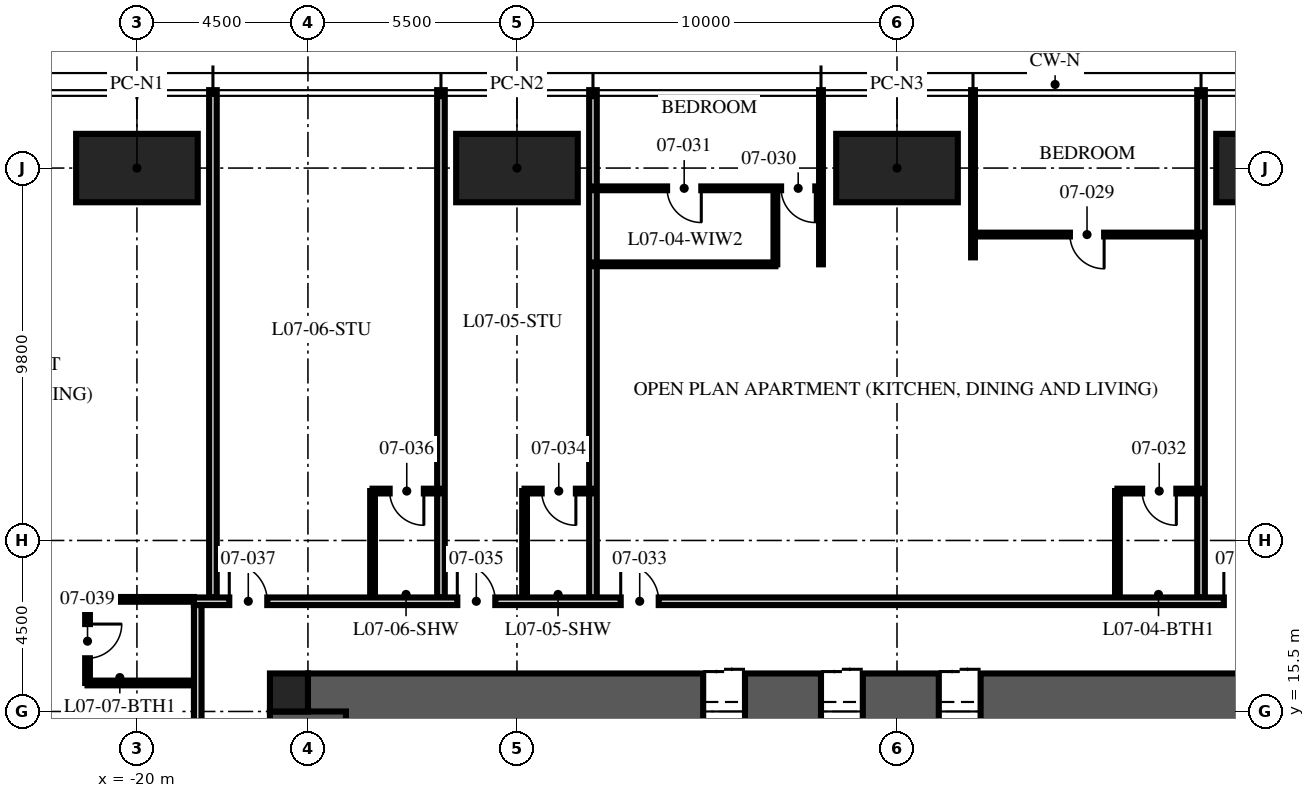
"""IFC4 building model, lengths in metres.
Left out: names, types, materials, properties, quantities, classifications, styles, units other than length and angle.
Written with IfcOpenShell. Run it as: python <this file> out.ifc"""

import sys

from ifc_helpers import new_model, si_unit, direction, frame, frame_2d, origin, origin_2d, place, context, subcontext, project, spatial, rectangle, hollow_rectangle, extrude, element, fill, save


model = new_model("IFC4")
c1 = context("Model", 3, precision=1e-05, world=origin(), true_north=direction((0.0, 1.0)))
c2 = subcontext(c1, "Body", "Model", "MODEL_VIEW")
j1 = project(units=[si_unit("LENGTHUNIT", "METRE"), si_unit("PLANEANGLEUNIT", "RADIAN")], contexts=[c1])
p1 = place(None, origin())
s1 = spatial("IfcSite", under=j1, at=p1, CompositionType="ELEMENT")
p2 = place(p1, origin())
s2 = spatial("IfcBuilding", under=s1, at=p2, CompositionType="ELEMENT")
p3 = place(p2, frame((0.0, 0.0, 32.25)))
s3 = spatial("IfcBuildingStorey", under=s2, at=p3, CompositionType="ELEMENT", Elevation=32.25)
p4 = place(p3, frame((-15.5, 15.5, -0.25), z_axis=(0.0, 0.0, 1.0), x_axis=(1.0, 0.0, 0.0)))
e1 = element("IfcWall", 1, at=p4, inside=s3, PredefinedType="SHEAR", context=c2, shape_type="SweptSolid", body=[
    extrude(rectangle(XDim=31.0, YDim=2.0, at=frame_2d((15.5, 0.0))), origin(), (0.0, 0.0, 1.0), 3.75),
])
p5 = place(p4, frame((10.4, 0.0, 0.25)))
e2 = element("IfcOpeningElement", 2, at=p5, cuts=e1, PredefinedType="OPENING", context=c2, shape_type="SweptSolid", body=[
    extrude(rectangle(XDim=1.1, YDim=2.1, at=frame_2d((0.55, 1.05))), frame((0.0, 1.01, 0.0), z_axis=(0.0, -1.0, 0.0), x_axis=(1.0, 0.0, 0.0)), (0.0, 0.0, 1.0), 2.02),
])
p6 = place(p4, frame((13.5, 0.0, 0.25)))
e3 = element("IfcOpeningElement", 3, at=p6, cuts=e1, PredefinedType="OPENING", context=c2, shape_type="SweptSolid", body=[
    extrude(rectangle(XDim=1.1, YDim=2.1, at=frame_2d((0.55, 1.05))), frame((0.0, 1.01, 0.0), z_axis=(0.0, -1.0, 0.0), x_axis=(1.0, 0.0, 0.0)), (0.0, 0.0, 1.0), 2.02),
])
p7 = place(p4, frame((16.6, 0.0, 0.25)))
e4 = element("IfcOpeningElement", 4, at=p7, cuts=e1, PredefinedType="OPENING", context=c2, shape_type="SweptSolid", body=[
    extrude(rectangle(XDim=1.1, YDim=2.1, at=frame_2d((0.55, 1.05))), frame((0.0, 1.01, 0.0), z_axis=(0.0, -1.0, 0.0), x_axis=(1.0, 0.0, 0.0)), (0.0, 0.0, 1.0), 2.02),
])
p8 = place(p3, frame((-15.5, -15.5, -0.25), z_axis=(0.0, 0.0, 1.0), x_axis=(0.0, 1.0, 0.0)))
e5 = element("IfcWall", 5, at=p8, inside=s3, PredefinedType="SHEAR", context=c2, shape_type="SweptSolid", body=[
    extrude(rectangle(XDim=31.0, YDim=2.0, at=frame_2d((15.5, 0.0))), origin(), (0.0, 0.0, 1.0), 3.75),
])
p9 = place(p8, frame((6.5, 0.0, 0.25)))
e6 = element("IfcOpeningElement", 6, at=p9, cuts=e5, PredefinedType="OPENING", context=c2, shape_type="SweptSolid", body=[
    extrude(rectangle(XDim=1.2, YDim=2.1, at=frame_2d((0.6, 1.05))), frame((0.0, 1.01, 0.0), z_axis=(0.0, -1.0, 0.0), x_axis=(1.0, 0.0, 0.0)), (0.0, 0.0, 1.0), 2.02),
])
p10 = place(p8, frame((23.0, 0.0, 0.25)))
e7 = element("IfcOpeningElement", 7, at=p10, cuts=e5, PredefinedType="OPENING", context=c2, shape_type="SweptSolid", body=[
    extrude(rectangle(XDim=1.8, YDim=2.1, at=frame_2d((0.9, 1.05))), frame((0.0, 1.01, 0.0), z_axis=(0.0, -1.0, 0.0), x_axis=(1.0, 0.0, 0.0)), (0.0, 0.0, 1.0), 2.02),
])
p11 = place(p3, frame((-16.0, 16.0, -0.25), z_axis=(0.0, 0.0, 1.0), x_axis=(1.0, 0.0, 0.0)))
e8 = element("IfcColumn", 8, at=p11, inside=s3, PredefinedType="COLUMN", context=c2, shape_type="SweptSolid", body=[
    extrude(rectangle(XDim=1.0, YDim=1.0, at=origin_2d()), origin(), (0.0, 0.0, 1.0), 3.75),
])
for number, where, z_axis, x_axis in (
    (9, (-20.0, 29.8, 0.0), (0.0, 0.0, 1.0), (1.0, 0.0, 0.0)),
    (10, (-10.0, 29.8, 0.0), (0.0, 0.0, 1.0), (1.0, 0.0, 0.0)),
    (11, (0.0, 29.8, 0.0), (0.0, 0.0, 1.0), (1.0, 0.0, 0.0)),
    (12, (10.0, 29.8, 0.0), (0.0, 0.0, 1.0), (1.0, 0.0, 0.0)),
):
    element("IfcColumn", number, at=place(p3, frame(where, z_axis=z_axis, x_axis=x_axis)), inside=s3, PredefinedType="COLUMN", context=c2, shape_type="SweptSolid", body=[
        extrude(hollow_rectangle(XDim=3.2, YDim=1.8, WallThickness=0.2, at=origin_2d()), origin(), (0.0, 0.0, 1.0), 3.75),
    ])
p12 = place(p3, frame((8.0, 18.5, 0.0), z_axis=(0.0, 0.0, 1.0), x_axis=(0.0, 1.0, 0.0)))
e13 = element("IfcWall", 13, at=p12, inside=s3, PredefinedType="PARTITIONING", context=c2, shape_type="SweptSolid", body=[
    extrude(rectangle(XDim=13.35, YDim=0.2, at=frame_2d((6.675, 0.0))), origin(), (0.0, 0.0, 1.0), 2.71),
])
p13 = place(p3, frame((2.0, 27.45, 0.0), z_axis=(0.0, 0.0, 1.0), x_axis=(0.0, 1.0, 0.0)))
e14 = element("IfcWall", 14, at=p13, inside=s3, PredefinedType="PARTITIONING", context=c2, shape_type="SweptSolid", body=[
    extrude(rectangle(XDim=4.4, YDim=0.1, at=frame_2d((2.2, 0.0))), origin(), (0.0, 0.0, 1.0), 2.71),
])
p14 = place(p3, frame((-2.0, 27.267, 0.0), z_axis=(0.0, 0.0, 1.0), x_axis=(0.0, 1.0, 0.0)))
e15 = element("IfcWall", 15, at=p14, inside=s3, PredefinedType="PARTITIONING", context=c2, shape_type="SweptSolid", body=[
    extrude(rectangle(XDim=4.583, YDim=0.1, at=frame_2d((2.292, 0.0))), origin(), (0.0, 0.0, 1.0), 2.71),
])
for number, where, z_axis, x_axis in (
    (16, (-8.0, 18.5, 0.0), (0.0, 0.0, 1.0), (0.0, 1.0, 0.0)),
    (17, (-12.0, 18.5, 0.0), (0.0, 0.0, 1.0), (0.0, 1.0, 0.0)),
):
    element("IfcWall", number, at=place(p3, frame(where, z_axis=z_axis, x_axis=x_axis)), inside=s3, PredefinedType="PARTITIONING", context=c2, shape_type="SweptSolid", body=[
        extrude(rectangle(XDim=13.35, YDim=0.2, at=frame_2d((6.675, 0.0))), origin(), (0.0, 0.0, 1.0), 2.71),
    ])
p15 = place(p3, frame((-18.0, 18.5, 0.0), z_axis=(0.0, 0.0, 1.0), x_axis=(0.0, 1.0, 0.0)))
e18 = element("IfcWall", 18, at=p15, inside=s3, PredefinedType="PARTITIONING", context=c2, shape_type="SweptSolid", body=[
    extrude(rectangle(XDim=13.35, YDim=0.2, at=frame_2d((6.675, 0.0))), origin(), (0.0, 0.0, 1.0), 2.3),
])
p16 = place(p3, frame((8.0, 28.05, 0.0), z_axis=(0.0, 0.0, 1.0), x_axis=(-1.0, 0.0, 0.0)))
e19 = element("IfcWall", 19, at=p16, inside=s3, PredefinedType="PARTITIONING", context=c2, shape_type="SweptSolid", body=[
    extrude(rectangle(XDim=6.0, YDim=0.1, at=frame_2d((3.0, 0.0))), origin(), (0.0, 0.0, 1.0), 2.61),
])
p17 = place(p16, frame((2.55, 0.0, 0.0)))
e20 = element("IfcOpeningElement", 20, at=p17, cuts=e19, PredefinedType="OPENING", context=c2, shape_type="SweptSolid", body=[
    extrude(rectangle(XDim=0.9, YDim=2.1, at=frame_2d((0.45, 1.05))), frame((0.0, 0.06, 0.0), z_axis=(0.0, -1.0, 0.0), x_axis=(1.0, 0.0, 0.0)), (0.0, 0.0, 1.0), 0.12),
])
p18 = place(p3, frame((-2.0, 29.267, 0.0), z_axis=(0.0, 0.0, 1.0), x_axis=(-1.0, 0.0, 0.0)))
e21 = element("IfcWall", 21, at=p18, inside=s3, PredefinedType="PARTITIONING", context=c2, shape_type="SweptSolid", body=[
    extrude(rectangle(XDim=6.0, YDim=0.1, at=frame_2d((3.0, 0.0))), origin(), (0.0, 0.0, 1.0), 2.61),
])
p19 = place(p18, frame((0.15, 0.0, 0.0)))
e22 = element("IfcOpeningElement", 22, at=p19, cuts=e21, PredefinedType="OPENING", context=c2, shape_type="SweptSolid", body=[
    extrude(rectangle(XDim=0.9, YDim=2.1, at=frame_2d((0.45, 1.05))), frame((0.0, 0.06, 0.0), z_axis=(0.0, -1.0, 0.0), x_axis=(1.0, 0.0, 0.0)), (0.0, 0.0, 1.0), 0.12),
])
p20 = place(p18, frame((3.15, 0.0, 0.0)))
e23 = element("IfcOpeningElement", 23, at=p20, cuts=e21, PredefinedType="OPENING", context=c2, shape_type="SweptSolid", body=[
    extrude(rectangle(XDim=0.9, YDim=2.1, at=frame_2d((0.45, 1.05))), frame((0.0, 0.06, 0.0), z_axis=(0.0, -1.0, 0.0), x_axis=(1.0, 0.0, 0.0)), (0.0, 0.0, 1.0), 0.12),
])
p21 = place(p3, frame((-3.2, 27.267, 0.0), z_axis=(0.0, 0.0, 1.0), x_axis=(0.0, 1.0, 0.0)))
e24 = element("IfcWall", 24, at=p21, inside=s3, PredefinedType="PARTITIONING", context=c2, shape_type="SweptSolid", body=[
    extrude(rectangle(XDim=2.0, YDim=0.1, at=frame_2d((1.0, 0.0))), origin(), (0.0, 0.0, 1.0), 3.5),
])
p22 = place(p3, frame((-3.2, 27.267, 0.0), z_axis=(0.0, 0.0, 1.0), x_axis=(-1.0, 0.0, 0.0)))
e25 = element("IfcWall", 25, at=p22, inside=s3, PredefinedType="PARTITIONING", context=c2, shape_type="SweptSolid", body=[
    extrude(rectangle(XDim=4.8, YDim=0.1, at=frame_2d((2.4, 0.0))), origin(), (0.0, 0.0, 1.0), 2.61),
])
p23 = place(p3, frame((8.0, 21.3, 0.0), z_axis=(0.0, 0.0, 1.0), x_axis=(-1.0, 0.0, 0.0)))
e26 = element("IfcWall", 26, at=p23, inside=s3, PredefinedType="PARTITIONING", context=c2, shape_type="SweptSolid", body=[
    extrude(rectangle(XDim=2.2, YDim=0.125, at=frame_2d((1.1, 0.0))), origin(), (0.0, 0.0, 1.0), 3.5),
])
p24 = place(p23, frame((0.65, 0.0, 0.0)))
e27 = element("IfcOpeningElement", 27, at=p24, cuts=e26, PredefinedType="OPENING", context=c2, shape_type="SweptSolid", body=[
    extrude(rectangle(XDim=0.9, YDim=2.1, at=frame_2d((0.45, 1.05))), frame((0.0, 0.073, 0.0), z_axis=(0.0, -1.0, 0.0), x_axis=(1.0, 0.0, 0.0)), (0.0, 0.0, 1.0), 0.145),
])
p25 = place(p3, frame((5.8, 18.5, 0.0), z_axis=(0.0, 0.0, 1.0), x_axis=(0.0, 1.0, 0.0)))
e28 = element("IfcWall", 28, at=p25, inside=s3, PredefinedType="PARTITIONING", context=c2, shape_type="SweptSolid", body=[
    extrude(rectangle(XDim=2.8, YDim=0.125, at=frame_2d((1.4, 0.0))), origin(), (0.0, 0.0, 1.0), 3.5),
])
p26 = place(p3, frame((-8.0, 21.3, 0.0), z_axis=(0.0, 0.0, 1.0), x_axis=(-1.0, 0.0, 0.0)))
e29 = element("IfcWall", 29, at=p26, inside=s3, PredefinedType="PARTITIONING", context=c2, shape_type="SweptSolid", body=[
    extrude(rectangle(XDim=1.8, YDim=0.125, at=frame_2d((0.9, 0.0))), origin(), (0.0, 0.0, 1.0), 3.5),
])
p27 = place(p26, frame((0.45, 0.0, 0.0)))
e30 = element("IfcOpeningElement", 30, at=p27, cuts=e29, PredefinedType="OPENING", context=c2, shape_type="SweptSolid", body=[
    extrude(rectangle(XDim=0.9, YDim=2.1, at=frame_2d((0.45, 1.05))), frame((0.0, 0.073, 0.0), z_axis=(0.0, -1.0, 0.0), x_axis=(1.0, 0.0, 0.0)), (0.0, 0.0, 1.0), 0.145),
])
p28 = place(p3, frame((-9.8, 18.5, 0.0), z_axis=(0.0, 0.0, 1.0), x_axis=(0.0, 1.0, 0.0)))
e31 = element("IfcWall", 31, at=p28, inside=s3, PredefinedType="PARTITIONING", context=c2, shape_type="SweptSolid", body=[
    extrude(rectangle(XDim=2.8, YDim=0.125, at=frame_2d((1.4, 0.0))), origin(), (0.0, 0.0, 1.0), 2.492),
])
p29 = place(p3, frame((-12.0, 21.3, 0.0), z_axis=(0.0, 0.0, 1.0), x_axis=(-1.0, 0.0, 0.0)))
e32 = element("IfcWall", 32, at=p29, inside=s3, PredefinedType="PARTITIONING", context=c2, shape_type="SweptSolid", body=[
    extrude(rectangle(XDim=1.8, YDim=0.125, at=frame_2d((0.9, 0.0))), origin(), (0.0, 0.0, 1.0), 3.5),
])
p30 = place(p29, frame((0.45, 0.0, 0.0)))
e33 = element("IfcOpeningElement", 33, at=p30, cuts=e32, PredefinedType="OPENING", context=c2, shape_type="SweptSolid", body=[
    extrude(rectangle(XDim=0.9, YDim=2.1, at=frame_2d((0.45, 1.05))), frame((0.0, 0.073, 0.0), z_axis=(0.0, -1.0, 0.0), x_axis=(1.0, 0.0, 0.0)), (0.0, 0.0, 1.0), 0.145),
])
p31 = place(p3, frame((-13.8, 18.5, 0.0), z_axis=(0.0, 0.0, 1.0), x_axis=(0.0, 1.0, 0.0)))
e34 = element("IfcWall", 34, at=p31, inside=s3, PredefinedType="PARTITIONING", context=c2, shape_type="SweptSolid", body=[
    extrude(rectangle(XDim=2.8, YDim=0.125, at=frame_2d((1.4, 0.0))), origin(), (0.0, 0.0, 1.0), 3.5),
])
p32 = place(p3, frame((-21.3, 18.45, 0.0), z_axis=(0.0, 0.0, 1.0), x_axis=(0.0, -1.0, 0.0)))
e35 = element("IfcWall", 35, at=p32, inside=s3, PredefinedType="PARTITIONING", context=c2, shape_type="SweptSolid", body=[
    extrude(rectangle(XDim=2.2, YDim=0.125, at=frame_2d((1.1, 0.0))), origin(), (0.0, 0.0, 1.0), 3.5),
])
p33 = place(p32, frame((0.65, 0.0, 0.0)))
e36 = element("IfcOpeningElement", 36, at=p33, cuts=e35, PredefinedType="OPENING", context=c2, shape_type="SweptSolid", body=[
    extrude(rectangle(XDim=0.9, YDim=2.1, at=frame_2d((0.45, 1.05))), frame((0.0, 0.073, 0.0), z_axis=(0.0, -1.0, 0.0), x_axis=(1.0, 0.0, 0.0)), (0.0, 0.0, 1.0), 0.145),
])
p34 = place(p3, frame((-18.5, 18.45, 0.0), z_axis=(0.0, 0.0, 1.0), x_axis=(-1.0, 0.0, 0.0)))
e37 = element("IfcWall", 37, at=p34, inside=s3, PredefinedType="PARTITIONING", context=c2, shape_type="SweptSolid", body=[
    extrude(rectangle(XDim=2.8, YDim=0.125, at=frame_2d((1.4, 0.0))), origin(), (0.0, 0.0, 1.0), 2.3),
])
p35 = place(p3, frame((-18.5, 16.25, 0.0), z_axis=(0.0, 0.0, 1.0), x_axis=(-1.0, 0.0, 0.0)))
e38 = element("IfcWall", 38, at=p35, inside=s3, PredefinedType="PARTITIONING", context=c2, shape_type="SweptSolid", body=[
    extrude(rectangle(XDim=2.8, YDim=0.125, at=frame_2d((1.4, 0.0))), origin(), (0.0, 0.0, 1.0), 3.5),
])
p36 = place(p3, frame((-18.5, 18.4, 0.0), z_axis=(0.0, 0.0, 1.0), x_axis=(1.0, 0.0, 0.0)))
e39 = element("IfcWall", 39, at=p36, inside=s3, PredefinedType="PARTITIONING", context=c2, shape_type="SweptSolid", body=[
    extrude(rectangle(XDim=37.0, YDim=0.2, at=frame_2d((18.5, 0.0))), origin(), (0.0, 0.0, 1.0), 2.3),
])
p37 = place(p36, frame((27.1, 0.0, 0.0)))
e40 = element("IfcOpeningElement", 40, at=p37, cuts=e39, PredefinedType="OPENING", context=c2, shape_type="SweptSolid", body=[
    extrude(rectangle(XDim=1.0, YDim=2.2, at=frame_2d((0.5, 1.1))), frame((0.0, 0.11, 0.0), z_axis=(0.0, -1.0, 0.0), x_axis=(1.0, 0.0, 0.0)), (0.0, 0.0, 1.0), 0.22),
])
p38 = place(p36, frame((11.23, 0.0, 0.0)))
e41 = element("IfcOpeningElement", 41, at=p38, cuts=e39, PredefinedType="OPENING", context=c2, shape_type="SweptSolid", body=[
    extrude(rectangle(XDim=1.0, YDim=2.2, at=frame_2d((0.5, 1.1))), frame((0.0, 0.11, 0.0), z_axis=(0.0, -1.0, 0.0), x_axis=(1.0, 0.0, 0.0)), (0.0, 0.0, 1.0), 0.22),
])
p39 = place(p36, frame((6.93, 0.0, 0.0)))
e42 = element("IfcOpeningElement", 42, at=p39, cuts=e39, PredefinedType="OPENING", context=c2, shape_type="SweptSolid", body=[
    extrude(rectangle(XDim=1.0, YDim=2.2, at=frame_2d((0.5, 1.1))), frame((0.0, 0.11, 0.0), z_axis=(0.0, -1.0, 0.0), x_axis=(1.0, 0.0, 0.0)), (0.0, 0.0, 1.0), 0.22),
])
p40 = place(p36, frame((0.93, 0.0, 0.0)))
e43 = element("IfcOpeningElement", 43, at=p40, cuts=e39, PredefinedType="OPENING", context=c2, shape_type="SweptSolid", body=[
    extrude(rectangle(XDim=1.0, YDim=2.2, at=frame_2d((0.5, 1.1))), frame((0.0, 0.11, 0.0), z_axis=(0.0, -1.0, 0.0), x_axis=(1.0, 0.0, 0.0)), (0.0, 0.0, 1.0), 0.22),
])
p41 = place(p3, frame((-18.4, 18.3, 0.0), z_axis=(0.0, 0.0, 1.0), x_axis=(0.0, -1.0, 0.0)))
e44 = element("IfcWall", 44, at=p41, inside=s3, PredefinedType="PARTITIONING", context=c2, shape_type="SweptSolid", body=[
    extrude(rectangle(XDim=14.3, YDim=0.2, at=frame_2d((7.15, 0.0))), origin(), (0.0, 0.0, 1.0), 2.3),
])
p42 = place(p41, frame((8.7, 0.0, 0.0)))
e45 = element("IfcOpeningElement", 45, at=p42, cuts=e44, PredefinedType="OPENING", context=c2, shape_type="SweptSolid", body=[
    extrude(rectangle(XDim=1.0, YDim=2.2, at=frame_2d((0.5, 1.1))), frame((0.0, 0.11, 0.0), z_axis=(0.0, -1.0, 0.0), x_axis=(1.0, 0.0, 0.0)), (0.0, 0.0, 1.0), 0.22),
])
p43 = place(p5, origin())
e46 = element("IfcDoor", 46, at=p43, inside=s3, OperationType="DOUBLE_DOOR_SLIDING", PredefinedType="DOOR", context=c2, shape_type="SweptSolid", body=[
    extrude(rectangle(XDim=1.1, YDim=2.1, at=frame_2d((0.55, 1.05))), frame((0.0, 0.025, 0.0), z_axis=(0.0, -1.0, 0.0), x_axis=(1.0, 0.0, 0.0)), (0.0, 0.0, 1.0), 0.05),
])
fill(e2, e46)
p44 = place(p6, origin())
e47 = element("IfcDoor", 47, at=p44, inside=s3, OperationType="DOUBLE_DOOR_SLIDING", PredefinedType="DOOR", context=c2, shape_type="SweptSolid", body=[
    extrude(rectangle(XDim=1.1, YDim=2.1, at=frame_2d((0.55, 1.05))), frame((0.0, 0.025, 0.0), z_axis=(0.0, -1.0, 0.0), x_axis=(1.0, 0.0, 0.0)), (0.0, 0.0, 1.0), 0.05),
])
fill(e3, e47)
p45 = place(p7, origin())
e48 = element("IfcDoor", 48, at=p45, inside=s3, OperationType="DOUBLE_DOOR_SLIDING", PredefinedType="DOOR", context=c2, shape_type="SweptSolid", body=[
    extrude(rectangle(XDim=1.1, YDim=2.1, at=frame_2d((0.55, 1.05))), frame((0.0, 0.025, 0.0), z_axis=(0.0, -1.0, 0.0), x_axis=(1.0, 0.0, 0.0)), (0.0, 0.0, 1.0), 0.05),
])
fill(e4, e48)
p46 = place(p37, origin())
e49 = element("IfcDoor", 49, at=p46, inside=s3, OperationType="SINGLE_SWING_LEFT", PredefinedType="DOOR", context=c2, shape_type="SweptSolid", body=[
    extrude(rectangle(XDim=1.0, YDim=2.2, at=frame_2d((0.5, 1.1))), frame((0.0, 0.025, 0.0), z_axis=(0.0, -1.0, 0.0), x_axis=(1.0, 0.0, 0.0)), (0.0, 0.0, 1.0), 0.05),
])
fill(e40, e49)
p47 = place(p17, origin())
e50 = element("IfcDoor", 50, at=p47, inside=s3, OperationType="SINGLE_SWING_LEFT", PredefinedType="DOOR", context=c2, shape_type="SweptSolid", body=[
    extrude(rectangle(XDim=0.9, YDim=2.1, at=frame_2d((0.45, 1.05))), frame((0.0, 0.025, 0.0), z_axis=(0.0, -1.0, 0.0), x_axis=(1.0, 0.0, 0.0)), (0.0, 0.0, 1.0), 0.05),
])
fill(e20, e50)
p48 = place(p19, origin())
e51 = element("IfcDoor", 51, at=p48, inside=s3, OperationType="SINGLE_SWING_LEFT", PredefinedType="DOOR", context=c2, shape_type="SweptSolid", body=[
    extrude(rectangle(XDim=0.9, YDim=2.1, at=frame_2d((0.45, 1.05))), frame((0.0, 0.025, 0.0), z_axis=(0.0, -1.0, 0.0), x_axis=(1.0, 0.0, 0.0)), (0.0, 0.0, 1.0), 0.05),
])
fill(e22, e51)
p49 = place(p20, origin())
e52 = element("IfcDoor", 52, at=p49, inside=s3, OperationType="SINGLE_SWING_LEFT", PredefinedType="DOOR", context=c2, shape_type="SweptSolid", body=[
    extrude(rectangle(XDim=0.9, YDim=2.1, at=frame_2d((0.45, 1.05))), frame((0.0, 0.025, 0.0), z_axis=(0.0, -1.0, 0.0), x_axis=(1.0, 0.0, 0.0)), (0.0, 0.0, 1.0), 0.05),
])
fill(e23, e52)
p50 = place(p24, origin())
e53 = element("IfcDoor", 53, at=p50, inside=s3, OperationType="SINGLE_SWING_LEFT", PredefinedType="DOOR", context=c2, shape_type="SweptSolid", body=[
    extrude(rectangle(XDim=0.9, YDim=2.1, at=frame_2d((0.45, 1.05))), frame((0.0, 0.025, 0.0), z_axis=(0.0, -1.0, 0.0), x_axis=(1.0, 0.0, 0.0)), (0.0, 0.0, 1.0), 0.05),
])
fill(e27, e53)
p51 = place(p38, origin())
e54 = element("IfcDoor", 54, at=p51, inside=s3, OperationType="SINGLE_SWING_LEFT", PredefinedType="DOOR", context=c2, shape_type="SweptSolid", body=[
    extrude(rectangle(XDim=1.0, YDim=2.2, at=frame_2d((0.5, 1.1))), frame((0.0, 0.025, 0.0), z_axis=(0.0, -1.0, 0.0), x_axis=(1.0, 0.0, 0.0)), (0.0, 0.0, 1.0), 0.05),
])
fill(e41, e54)
p52 = place(p27, origin())
e55 = element("IfcDoor", 55, at=p52, inside=s3, OperationType="SINGLE_SWING_LEFT", PredefinedType="DOOR", context=c2, shape_type="SweptSolid", body=[
    extrude(rectangle(XDim=0.9, YDim=2.1, at=frame_2d((0.45, 1.05))), frame((0.0, 0.025, 0.0), z_axis=(0.0, -1.0, 0.0), x_axis=(1.0, 0.0, 0.0)), (0.0, 0.0, 1.0), 0.05),
])
fill(e30, e55)
p53 = place(p39, origin())
e56 = element("IfcDoor", 56, at=p53, inside=s3, OperationType="SINGLE_SWING_LEFT", PredefinedType="DOOR", context=c2, shape_type="SweptSolid", body=[
    extrude(rectangle(XDim=1.0, YDim=2.2, at=frame_2d((0.5, 1.1))), frame((0.0, 0.025, 0.0), z_axis=(0.0, -1.0, 0.0), x_axis=(1.0, 0.0, 0.0)), (0.0, 0.0, 1.0), 0.05),
])
fill(e42, e56)
p54 = place(p30, origin())
e57 = element("IfcDoor", 57, at=p54, inside=s3, OperationType="SINGLE_SWING_LEFT", PredefinedType="DOOR", context=c2, shape_type="SweptSolid", body=[
    extrude(rectangle(XDim=0.9, YDim=2.1, at=frame_2d((0.45, 1.05))), frame((0.0, 0.025, 0.0), z_axis=(0.0, -1.0, 0.0), x_axis=(1.0, 0.0, 0.0)), (0.0, 0.0, 1.0), 0.05),
])
fill(e33, e57)
p55 = place(p40, origin())
e58 = element("IfcDoor", 58, at=p55, inside=s3, OperationType="SINGLE_SWING_LEFT", PredefinedType="DOOR", context=c2, shape_type="SweptSolid", body=[
    extrude(rectangle(XDim=1.0, YDim=2.2, at=frame_2d((0.5, 1.1))), frame((0.0, 0.025, 0.0), z_axis=(0.0, -1.0, 0.0), x_axis=(1.0, 0.0, 0.0)), (0.0, 0.0, 1.0), 0.05),
])
fill(e43, e58)
p56 = place(p33, origin())
e59 = element("IfcDoor", 59, at=p56, inside=s3, OperationType="SINGLE_SWING_LEFT", PredefinedType="DOOR", context=c2, shape_type="SweptSolid", body=[
    extrude(rectangle(XDim=0.9, YDim=2.1, at=frame_2d((0.45, 1.05))), frame((0.0, 0.025, 0.0), z_axis=(0.0, -1.0, 0.0), x_axis=(1.0, 0.0, 0.0)), (0.0, 0.0, 1.0), 0.05),
])
fill(e36, e59)
save(model, sys.argv[1])
